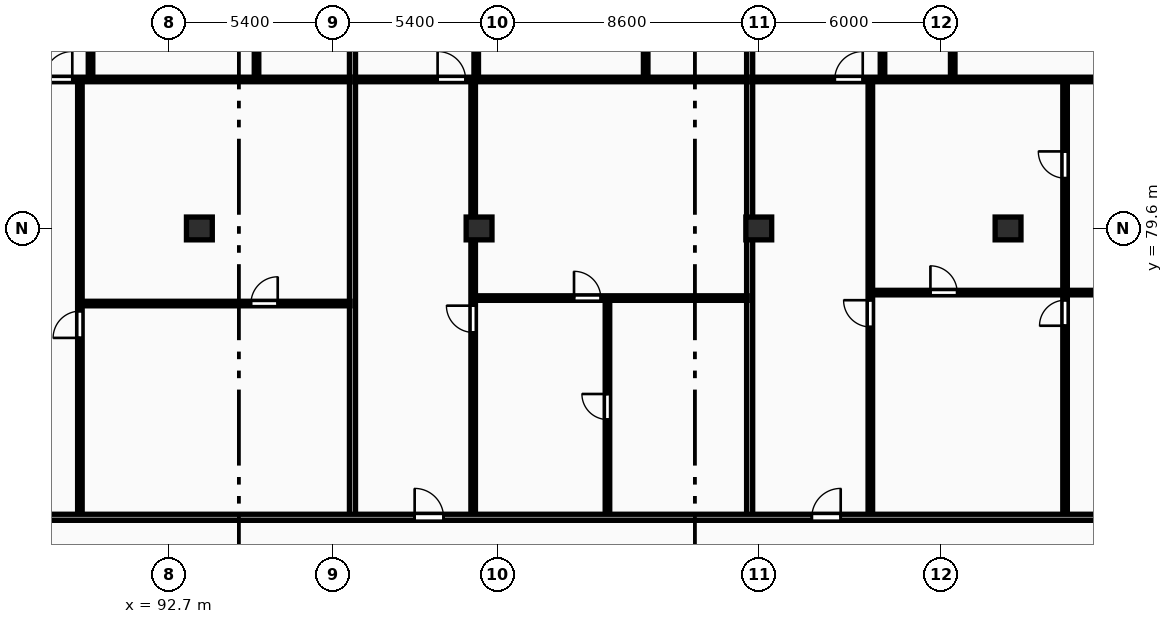
"""IFC4 building model, lengths in metres.
Left out: names, types, materials, properties, quantities, classifications, styles, units other than length and angle.
Written with IfcOpenShell. Run it as: python <this file> out.ifc"""

import sys

from ifc_helpers import new_model, si_unit, direction, frame, frame_2d, origin, origin_2d, place, context, subcontext, project, spatial, rectangle, extrude, element, fill, save


model = new_model("IFC4")
c1 = context("Model", 3, precision=1e-05, world=origin(), true_north=direction((0.0, 1.0)))
c2 = subcontext(c1, "Body", "Model", "MODEL_VIEW")
j1 = project(units=[si_unit("LENGTHUNIT", "METRE"), si_unit("PLANEANGLEUNIT", "RADIAN")], contexts=[c1])
p1 = place(None, origin())
s1 = spatial("IfcSite", under=j1, at=p1, CompositionType="ELEMENT")
p2 = place(p1, origin())
s2 = spatial("IfcBuilding", under=s1, at=p2, CompositionType="ELEMENT")
p3 = place(p2, frame((0.0, 0.0, 207.6)))
s3 = spatial("IfcBuildingStorey", under=s2, at=p3, CompositionType="ELEMENT", Elevation=207.6)
for number, where, z_axis, x_axis in (
    (1, (93.7, 79.6, 0.0), (0.0, 0.0, 1.0), (1.0, 0.0, 0.0)),
    (2, (102.9, 79.6, 0.0), (0.0, 0.0, 1.0), (1.0, 0.0, 0.0)),
    (3, (112.1, 79.6, 0.0), (0.0, 0.0, 1.0), (1.0, 0.0, 0.0)),
    (4, (120.3, 79.6, 0.0), (0.0, 0.0, 1.0), (1.0, 0.0, 0.0)),
):
    element("IfcColumn", number, at=place(p3, frame(where, z_axis=z_axis, x_axis=x_axis)), inside=s3, PredefinedType="COLUMN", context=c2, shape_type="SweptSolid", body=[
        extrude(rectangle(XDim=0.85, YDim=0.75, at=origin_2d()), origin(), (0.0, 0.0, 1.0), 3.25),
    ])
p4 = place(p3, frame((98.736, 70.18, 0.0), z_axis=(0.0, 0.0, 1.0), x_axis=(0.0, 1.0, 0.0)))
e5 = element("IfcWall", 5, at=p4, inside=s3, PredefinedType="PARTITIONING", context=c2, shape_type="SweptSolid", body=[
    extrude(rectangle(XDim=24.32, YDim=0.2, at=frame_2d((12.16, 0.0))), origin(), (0.0, 0.0, 1.0), 2.97),
])
p5 = place(p3, frame((89.83, 77.13, 0.0), z_axis=(0.0, 0.0, 1.0), x_axis=(1.0, 0.0, 0.0)))
e6 = element("IfcWall", 6, at=p5, inside=s3, PredefinedType="PARTITIONING", context=c2, shape_type="SweptSolid", body=[
    extrude(rectangle(XDim=8.826, YDim=0.15, at=frame_2d((4.413, 0.0))), origin(), (0.0, 0.0, 1.0), 2.97),
])
p6 = place(p5, frame((5.567, 0.0, 0.0)))
e7 = element("IfcOpeningElement", 7, at=p6, cuts=e6, PredefinedType="OPENING", context=c2, shape_type="SweptSolid", body=[
    extrude(rectangle(XDim=0.88, YDim=2.06, at=frame_2d((0.44, 1.03))), frame((0.0, 0.085, 0.0), z_axis=(0.0, -1.0, 0.0), x_axis=(1.0, 0.0, 0.0)), (0.0, 0.0, 1.0), 0.17),
])
p7 = place(p3, frame((89.77, 70.16, 0.0), z_axis=(0.0, 0.0, 1.0), x_axis=(0.0, 1.0, 0.0)))
e8 = element("IfcWall", 8, at=p7, inside=s3, PredefinedType="PARTITIONING", context=c2, shape_type="SweptSolid", body=[
    extrude(rectangle(XDim=14.3, YDim=0.15, at=frame_2d((7.15, 0.0))), origin(), (0.0, 0.0, 1.0), 2.97),
])
p8 = place(p7, frame((5.84, 0.0, 0.0)))
e9 = element("IfcOpeningElement", 9, at=p8, cuts=e8, PredefinedType="OPENING", context=c2, shape_type="SweptSolid", body=[
    extrude(rectangle(XDim=0.88, YDim=2.06, at=frame_2d((0.44, 1.03))), frame((0.0, 0.085, 0.0), z_axis=(0.0, -1.0, 0.0), x_axis=(1.0, 0.0, 0.0)), (0.0, 0.0, 1.0), 0.17),
])
p9 = place(p3, frame((90.12, 84.54, 0.0), z_axis=(0.0, 0.0, 1.0), x_axis=(0.0, 1.0, 0.0)))
e10 = element("IfcWall", 10, at=p9, inside=s3, PredefinedType="PARTITIONING", context=c2, shape_type="SweptSolid", body=[
    extrude(rectangle(XDim=5.0, YDim=0.15, at=frame_2d((2.5, 0.0))), origin(), (0.0, 0.0, 1.0), 2.97),
])
p10 = place(p9, frame((2.06, 0.0, 0.0)))
e11 = element("IfcOpeningElement", 11, at=p10, cuts=e10, PredefinedType="OPENING", context=c2, shape_type="SweptSolid", body=[
    extrude(rectangle(XDim=0.88, YDim=2.06, at=frame_2d((0.44, 1.03))), frame((0.0, 0.085, 0.0), z_axis=(0.0, -1.0, 0.0), x_axis=(1.0, 0.0, 0.0)), (0.0, 0.0, 1.0), 0.17),
])
p11 = place(p3, frame((95.58, 84.54, 0.0), z_axis=(0.0, 0.0, 1.0), x_axis=(0.0, 1.0, 0.0)))
e12 = element("IfcWall", 12, at=p11, inside=s3, PredefinedType="PARTITIONING", context=c2, shape_type="SweptSolid", body=[
    extrude(rectangle(XDim=9.96, YDim=0.15, at=frame_2d((4.98, 0.0))), origin(), (0.0, 0.0, 1.0), 2.97),
])
p12 = place(p11, frame((1.43, 0.0, 0.0)))
e13 = element("IfcOpeningElement", 13, at=p12, cuts=e12, PredefinedType="OPENING", context=c2, shape_type="SweptSolid", body=[
    extrude(rectangle(XDim=0.84, YDim=2.04, at=frame_2d((0.42, 1.02))), frame((0.0, 0.085, 0.0), z_axis=(0.0, -1.0, 0.0), x_axis=(1.0, 0.0, 0.0)), (0.0, 0.0, 1.0), 0.17),
])
p13 = place(p11, frame((3.92, 0.0, 0.0)))
e14 = element("IfcOpeningElement", 14, at=p13, cuts=e12, PredefinedType="OPENING", context=c2, shape_type="SweptSolid", body=[
    extrude(rectangle(XDim=0.84, YDim=2.04, at=frame_2d((0.42, 1.02))), frame((0.0, 0.085, 0.0), z_axis=(0.0, -1.0, 0.0), x_axis=(1.0, 0.0, 0.0)), (0.0, 0.0, 1.0), 0.17),
])
p14 = place(p11, frame((8.297, 0.0, 0.0)))
e15 = element("IfcOpeningElement", 15, at=p14, cuts=e12, PredefinedType="OPENING", context=c2, shape_type="SweptSolid", body=[
    extrude(rectangle(XDim=0.88, YDim=2.06, at=frame_2d((0.44, 1.03))), frame((0.0, 0.085, 0.0), z_axis=(0.0, -1.0, 0.0), x_axis=(1.0, 0.0, 0.0)), (0.0, 0.0, 1.0), 0.17),
])
p15 = place(p3, frame((85.88, 84.5, 0.0), z_axis=(0.0, 0.0, 1.0), x_axis=(1.0, 0.0, 0.0)))
e16 = element("IfcWall", 16, at=p15, inside=s3, PredefinedType="PARTITIONING", context=c2, shape_type="SweptSolid", body=[
    extrude(rectangle(XDim=12.776, YDim=0.15, at=frame_2d((6.388, 0.0))), origin(), (0.0, 0.0, 1.0), 2.97),
])
p16 = place(p15, frame((2.72, 0.0, 0.0)))
e17 = element("IfcOpeningElement", 17, at=p16, cuts=e16, PredefinedType="OPENING", context=c2, shape_type="SweptSolid", body=[
    extrude(rectangle(XDim=0.92, YDim=2.08, at=frame_2d((0.46, 1.04))), frame((0.0, 0.085, 0.0), z_axis=(0.0, -1.0, 0.0), x_axis=(1.0, 0.0, 0.0)), (0.0, 0.0, 1.0), 0.17),
])
p17 = place(p3, frame((111.8, 70.18, 0.0), z_axis=(0.0, 0.0, 1.0), x_axis=(0.0, 1.0, 0.0)))
e18 = element("IfcWall", 18, at=p17, inside=s3, PredefinedType="PARTITIONING", context=c2, shape_type="SweptSolid", body=[
    extrude(rectangle(XDim=24.32, YDim=0.2, at=frame_2d((12.16, 0.0))), origin(), (0.0, 0.0, 1.0), 2.97),
])
p18 = place(p3, frame((107.123, 70.16, 0.0), z_axis=(0.0, 0.0, 1.0), x_axis=(0.0, 1.0, 0.0)))
e19 = element("IfcWall", 19, at=p18, inside=s3, PredefinedType="PARTITIONING", context=c2, shape_type="SweptSolid", body=[
    extrude(rectangle(XDim=7.15, YDim=0.15, at=frame_2d((3.575, 0.0))), origin(), (0.0, 0.0, 1.0), 2.97),
])
p19 = place(p18, frame((3.155, 0.0, 0.0)))
e20 = element("IfcOpeningElement", 20, at=p19, cuts=e19, PredefinedType="OPENING", context=c2, shape_type="SweptSolid", body=[
    extrude(rectangle(XDim=0.84, YDim=2.04, at=frame_2d((0.42, 1.02))), frame((0.0, 0.085, 0.0), z_axis=(0.0, -1.0, 0.0), x_axis=(1.0, 0.0, 0.0)), (0.0, 0.0, 1.0), 0.17),
])
p20 = place(p3, frame((102.766, 77.31, 0.0), z_axis=(0.0, 0.0, 1.0), x_axis=(1.0, 0.0, 0.0)))
e21 = element("IfcWall", 21, at=p20, inside=s3, PredefinedType="PARTITIONING", context=c2, shape_type="SweptSolid", body=[
    extrude(rectangle(XDim=8.954, YDim=0.15, at=frame_2d((4.477, 0.0))), origin(), (0.0, 0.0, 1.0), 2.97),
])
p21 = place(p20, frame((3.257, 0.0, 0.0)))
e22 = element("IfcOpeningElement", 22, at=p21, cuts=e21, PredefinedType="OPENING", context=c2, shape_type="SweptSolid", body=[
    extrude(rectangle(XDim=0.88, YDim=2.06, at=frame_2d((0.44, 1.03))), frame((0.0, 0.085, 0.0), z_axis=(0.0, -1.0, 0.0), x_axis=(1.0, 0.0, 0.0)), (0.0, 0.0, 1.0), 0.17),
])
p22 = place(p3, frame((102.706, 70.16, 0.0), z_axis=(0.0, 0.0, 1.0), x_axis=(0.0, 1.0, 0.0)))
e23 = element("IfcWall", 23, at=p22, inside=s3, PredefinedType="PARTITIONING", context=c2, shape_type="SweptSolid", body=[
    extrude(rectangle(XDim=14.3, YDim=0.15, at=frame_2d((7.15, 0.0))), origin(), (0.0, 0.0, 1.0), 2.277),
])
p23 = place(p22, frame((6.02, 0.0, 0.0)))
e24 = element("IfcOpeningElement", 24, at=p23, cuts=e23, PredefinedType="OPENING", context=c2, shape_type="SweptSolid", body=[
    extrude(rectangle(XDim=0.88, YDim=2.06, at=frame_2d((0.44, 1.03))), frame((0.0, 0.085, 0.0), z_axis=(0.0, -1.0, 0.0), x_axis=(1.0, 0.0, 0.0)), (0.0, 0.0, 1.0), 0.17),
])
p24 = place(p3, frame((102.806, 84.54, 0.0), z_axis=(0.0, 0.0, 1.0), x_axis=(0.0, 1.0, 0.0)))
e25 = element("IfcWall", 25, at=p24, inside=s3, PredefinedType="PARTITIONING", context=c2, shape_type="SweptSolid", body=[
    extrude(rectangle(XDim=5.0, YDim=0.15, at=frame_2d((2.5, 0.0))), origin(), (0.0, 0.0, 1.0), 2.277),
])
p25 = place(p24, frame((2.06, 0.0, 0.0)))
e26 = element("IfcOpeningElement", 26, at=p25, cuts=e25, PredefinedType="OPENING", context=c2, shape_type="SweptSolid", body=[
    extrude(rectangle(XDim=0.88, YDim=2.06, at=frame_2d((0.44, 1.03))), frame((0.0, 0.085, 0.0), z_axis=(0.0, -1.0, 0.0), x_axis=(1.0, 0.0, 0.0)), (0.0, 0.0, 1.0), 0.17),
])
p26 = place(p3, frame((108.38, 84.54, 0.0), z_axis=(0.0, 0.0, 1.0), x_axis=(0.0, 1.0, 0.0)))
e27 = element("IfcWall", 27, at=p26, inside=s3, PredefinedType="PARTITIONING", context=c2, shape_type="SweptSolid", body=[
    extrude(rectangle(XDim=9.96, YDim=0.15, at=frame_2d((4.98, 0.0))), origin(), (0.0, 0.0, 1.0), 2.97),
])
p27 = place(p26, frame((1.43, 0.0, 0.0)))
e28 = element("IfcOpeningElement", 28, at=p27, cuts=e27, PredefinedType="OPENING", context=c2, shape_type="SweptSolid", body=[
    extrude(rectangle(XDim=0.84, YDim=2.04, at=frame_2d((0.42, 1.02))), frame((0.0, 0.085, 0.0), z_axis=(0.0, -1.0, 0.0), x_axis=(1.0, 0.0, 0.0)), (0.0, 0.0, 1.0), 0.17),
])
p28 = place(p26, frame((3.92, 0.0, 0.0)))
e29 = element("IfcOpeningElement", 29, at=p28, cuts=e27, PredefinedType="OPENING", context=c2, shape_type="SweptSolid", body=[
    extrude(rectangle(XDim=0.84, YDim=2.04, at=frame_2d((0.42, 1.02))), frame((0.0, 0.085, 0.0), z_axis=(0.0, -1.0, 0.0), x_axis=(1.0, 0.0, 0.0)), (0.0, 0.0, 1.0), 0.17),
])
p29 = place(p26, frame((5.48, 0.0, 0.0)))
e30 = element("IfcOpeningElement", 30, at=p29, cuts=e27, PredefinedType="OPENING", context=c2, shape_type="SweptSolid", body=[
    extrude(rectangle(XDim=0.88, YDim=2.06, at=frame_2d((0.44, 1.03))), frame((0.0, 0.085, 0.0), z_axis=(0.0, -1.0, 0.0), x_axis=(1.0, 0.0, 0.0)), (0.0, 0.0, 1.0), 0.17),
])
p30 = place(p3, frame((98.816, 84.5, 0.0), z_axis=(0.0, 0.0, 1.0), x_axis=(1.0, 0.0, 0.0)))
e31 = element("IfcWall", 31, at=p30, inside=s3, PredefinedType="PARTITIONING", context=c2, shape_type="SweptSolid", body=[
    extrude(rectangle(XDim=12.904, YDim=0.15, at=frame_2d((6.452, 0.0))), origin(), (0.0, 0.0, 1.0), 2.97),
])
p31 = place(p30, frame((2.72, 0.0, 0.0)))
e32 = element("IfcOpeningElement", 32, at=p31, cuts=e31, PredefinedType="OPENING", context=c2, shape_type="SweptSolid", body=[
    extrude(rectangle(XDim=0.92, YDim=2.08, at=frame_2d((0.46, 1.04))), frame((0.0, 0.085, 0.0), z_axis=(0.0, -1.0, 0.0), x_axis=(1.0, 0.0, 0.0)), (0.0, 0.0, 1.0), 0.17),
])
p32 = place(p3, frame((122.175, 70.16, 0.0), z_axis=(0.0, 0.0, 1.0), x_axis=(0.0, 1.0, 0.0)))
e33 = element("IfcWall", 33, at=p32, inside=s3, PredefinedType="PARTITIONING", context=c2, shape_type="SweptSolid", body=[
    extrude(rectangle(XDim=14.3, YDim=0.15, at=frame_2d((7.15, 0.0))), origin(), (0.0, 0.0, 1.0), 2.97),
])
p33 = place(p32, frame((6.24, 0.0, 0.0)))
e34 = element("IfcOpeningElement", 34, at=p33, cuts=e33, PredefinedType="OPENING", context=c2, shape_type="SweptSolid", body=[
    extrude(rectangle(XDim=0.84, YDim=2.04, at=frame_2d((0.42, 1.02))), frame((0.0, 0.085, 0.0), z_axis=(0.0, -1.0, 0.0), x_axis=(1.0, 0.0, 0.0)), (0.0, 0.0, 1.0), 0.17),
])
p34 = place(p32, frame((11.094, 0.0, 0.0)))
e35 = element("IfcOpeningElement", 35, at=p34, cuts=e33, PredefinedType="OPENING", context=c2, shape_type="SweptSolid", body=[
    extrude(rectangle(XDim=0.88, YDim=2.06, at=frame_2d((0.44, 1.03))), frame((0.0, 0.085, 0.0), z_axis=(0.0, -1.0, 0.0), x_axis=(1.0, 0.0, 0.0)), (0.0, 0.0, 1.0), 0.17),
])
p35 = place(p3, frame((115.83, 77.49, 0.0), z_axis=(0.0, 0.0, 1.0), x_axis=(1.0, 0.0, 0.0)))
e36 = element("IfcWall", 36, at=p35, inside=s3, PredefinedType="PARTITIONING", context=c2, shape_type="SweptSolid", body=[
    extrude(rectangle(XDim=12.49, YDim=0.15, at=frame_2d((6.245, 0.0))), origin(), (0.0, 0.0, 1.0), 2.97),
])
p36 = place(p35, frame((1.917, 0.0, 0.0)))
e37 = element("IfcOpeningElement", 37, at=p36, cuts=e36, PredefinedType="OPENING", context=c2, shape_type="SweptSolid", body=[
    extrude(rectangle(XDim=0.88, YDim=2.06, at=frame_2d((0.44, 1.03))), frame((0.0, 0.085, 0.0), z_axis=(0.0, -1.0, 0.0), x_axis=(1.0, 0.0, 0.0)), (0.0, 0.0, 1.0), 0.17),
])
p37 = place(p3, frame((115.77, 70.16, 0.0), z_axis=(0.0, 0.0, 1.0), x_axis=(0.0, 1.0, 0.0)))
e38 = element("IfcWall", 38, at=p37, inside=s3, PredefinedType="PARTITIONING", context=c2, shape_type="SweptSolid", body=[
    extrude(rectangle(XDim=14.3, YDim=0.15, at=frame_2d((7.15, 0.0))), origin(), (0.0, 0.0, 1.0), 2.97),
])
p38 = place(p37, frame((6.2, 0.0, 0.0)))
e39 = element("IfcOpeningElement", 39, at=p38, cuts=e38, PredefinedType="OPENING", context=c2, shape_type="SweptSolid", body=[
    extrude(rectangle(XDim=0.88, YDim=2.06, at=frame_2d((0.44, 1.03))), frame((0.0, 0.085, 0.0), z_axis=(0.0, -1.0, 0.0), x_axis=(1.0, 0.0, 0.0)), (0.0, 0.0, 1.0), 0.17),
])
p39 = place(p3, frame((118.48, 84.54, 0.0), z_axis=(0.0, 0.0, 1.0), x_axis=(0.0, 1.0, 0.0)))
e40 = element("IfcWall", 40, at=p39, inside=s3, PredefinedType="PARTITIONING", context=c2, shape_type="SweptSolid", body=[
    extrude(rectangle(XDim=2.47, YDim=0.15, at=frame_2d((1.235, 0.0))), origin(), (0.0, 0.0, 1.0), 2.97),
])
p40 = place(p3, frame((116.17, 84.54, 0.0), z_axis=(0.0, 0.0, 1.0), x_axis=(0.0, 1.0, 0.0)))
e41 = element("IfcWall", 41, at=p40, inside=s3, PredefinedType="PARTITIONING", context=c2, shape_type="SweptSolid", body=[
    extrude(rectangle(XDim=9.96, YDim=0.15, at=frame_2d((4.98, 0.0))), origin(), (0.0, 0.0, 1.0), 2.97),
])
p41 = place(p40, frame((3.82, 0.0, 0.0)))
e42 = element("IfcOpeningElement", 42, at=p41, cuts=e41, PredefinedType="OPENING", context=c2, shape_type="SweptSolid", body=[
    extrude(rectangle(XDim=0.92, YDim=2.08, at=frame_2d((0.46, 1.04))), frame((0.0, 0.085, 0.0), z_axis=(0.0, -1.0, 0.0), x_axis=(1.0, 0.0, 0.0)), (0.0, 0.0, 1.0), 0.17),
])
p42 = place(p3, frame((111.88, 84.5, 0.0), z_axis=(0.0, 0.0, 1.0), x_axis=(1.0, 0.0, 0.0)))
e43 = element("IfcWall", 43, at=p42, inside=s3, PredefinedType="PARTITIONING", context=c2, shape_type="SweptSolid", body=[
    extrude(rectangle(XDim=16.44, YDim=0.15, at=frame_2d((8.22, 0.0))), origin(), (0.0, 0.0, 1.0), 2.97),
])
p43 = place(p42, frame((2.72, 0.0, 0.0)))
e44 = element("IfcOpeningElement", 44, at=p43, cuts=e43, PredefinedType="OPENING", context=c2, shape_type="SweptSolid", body=[
    extrude(rectangle(XDim=0.92, YDim=2.08, at=frame_2d((0.46, 1.04))), frame((0.0, 0.085, 0.0), z_axis=(0.0, -1.0, 0.0), x_axis=(1.0, 0.0, 0.0)), (0.0, 0.0, 1.0), 0.17),
])
p44 = place(p3, frame((59.8, 70.1, 0.0), z_axis=(0.0, 0.0, 1.0), x_axis=(1.0, 0.0, 0.0)))
e45 = element("IfcWall", 45, at=p44, inside=s3, PredefinedType="PARTITIONING", context=c2, shape_type="SweptSolid", body=[
    extrude(rectangle(XDim=68.6, YDim=0.2, at=frame_2d((34.3, 0.0))), origin(), (0.0, 0.0, 1.0), 2.97),
])
p45 = place(p44, frame((2.045, 0.0, 0.0)))
e46 = element("IfcOpeningElement", 46, at=p45, cuts=e45, PredefinedType="OPENING", context=c2, shape_type="SweptSolid", body=[
    extrude(rectangle(XDim=0.95, YDim=2.15, at=frame_2d((0.475, 1.075))), frame((0.0, 0.11, 0.0), z_axis=(0.0, -1.0, 0.0), x_axis=(1.0, 0.0, 0.0)), (0.0, 0.0, 1.0), 0.22),
])
p46 = place(p44, frame((14.981, 0.0, 0.0)))
e47 = element("IfcOpeningElement", 47, at=p46, cuts=e45, PredefinedType="OPENING", context=c2, shape_type="SweptSolid", body=[
    extrude(rectangle(XDim=0.95, YDim=2.15, at=frame_2d((0.475, 1.075))), frame((0.0, 0.11, 0.0), z_axis=(0.0, -1.0, 0.0), x_axis=(1.0, 0.0, 0.0)), (0.0, 0.0, 1.0), 0.22),
])
p47 = place(p44, frame((28.045, 0.0, 0.0)))
e48 = element("IfcOpeningElement", 48, at=p47, cuts=e45, PredefinedType="OPENING", context=c2, shape_type="SweptSolid", body=[
    extrude(rectangle(XDim=0.95, YDim=2.15, at=frame_2d((0.475, 1.075))), frame((0.0, 0.11, 0.0), z_axis=(0.0, -1.0, 0.0), x_axis=(1.0, 0.0, 0.0)), (0.0, 0.0, 1.0), 0.22),
])
p48 = place(p44, frame((40.981, 0.0, 0.0)))
e49 = element("IfcOpeningElement", 49, at=p48, cuts=e45, PredefinedType="OPENING", context=c2, shape_type="SweptSolid", body=[
    extrude(rectangle(XDim=0.95, YDim=2.15, at=frame_2d((0.475, 1.075))), frame((0.0, 0.11, 0.0), z_axis=(0.0, -1.0, 0.0), x_axis=(1.0, 0.0, 0.0)), (0.0, 0.0, 1.0), 0.22),
])
p49 = place(p44, frame((54.045, 0.0, 0.0)))
e50 = element("IfcOpeningElement", 50, at=p49, cuts=e45, PredefinedType="OPENING", context=c2, shape_type="SweptSolid", body=[
    extrude(rectangle(XDim=0.95, YDim=2.15, at=frame_2d((0.475, 1.075))), frame((0.0, 0.11, 0.0), z_axis=(0.0, -1.0, 0.0), x_axis=(1.0, 0.0, 0.0)), (0.0, 0.0, 1.0), 0.22),
])
p50 = place(p6, origin())
e51 = element("IfcDoor", 51, at=p50, inside=s3, OperationType="SINGLE_SWING_RIGHT", PredefinedType="DOOR", context=c2, shape_type="SweptSolid", body=[
    extrude(rectangle(XDim=0.88, YDim=2.06, at=frame_2d((0.44, 1.03))), frame((0.0, 0.025, 0.0), z_axis=(0.0, -1.0, 0.0), x_axis=(1.0, 0.0, 0.0)), (0.0, 0.0, 1.0), 0.05),
])
fill(e7, e51)
p51 = place(p8, origin())
e52 = element("IfcDoor", 52, at=p51, inside=s3, OperationType="SINGLE_SWING_LEFT", PredefinedType="DOOR", context=c2, shape_type="SweptSolid", body=[
    extrude(rectangle(XDim=0.88, YDim=2.06, at=frame_2d((0.44, 1.03))), frame((0.0, 0.025, 0.0), z_axis=(0.0, -1.0, 0.0), x_axis=(1.0, 0.0, 0.0)), (0.0, 0.0, 1.0), 0.05),
])
fill(e9, e52)
p52 = place(p16, origin())
e53 = element("IfcDoor", 53, at=p52, inside=s3, OperationType="SINGLE_SWING_RIGHT", PredefinedType="DOOR", context=c2, shape_type="SweptSolid", body=[
    extrude(rectangle(XDim=0.92, YDim=2.08, at=frame_2d((0.46, 1.04))), frame((0.0, 0.025, 0.0), z_axis=(0.0, -1.0, 0.0), x_axis=(1.0, 0.0, 0.0)), (0.0, 0.0, 1.0), 0.05),
])
fill(e17, e53)
p53 = place(p19, origin())
e54 = element("IfcDoor", 54, at=p53, inside=s3, OperationType="SINGLE_SWING_RIGHT", PredefinedType="DOOR", context=c2, shape_type="SweptSolid", body=[
    extrude(rectangle(XDim=0.84, YDim=2.04, at=frame_2d((0.42, 1.02))), frame((0.0, 0.025, 0.0), z_axis=(0.0, -1.0, 0.0), x_axis=(1.0, 0.0, 0.0)), (0.0, 0.0, 1.0), 0.05),
])
fill(e20, e54)
p54 = place(p21, origin())
e55 = element("IfcDoor", 55, at=p54, inside=s3, OperationType="SINGLE_SWING_LEFT", PredefinedType="DOOR", context=c2, shape_type="SweptSolid", body=[
    extrude(rectangle(XDim=0.88, YDim=2.06, at=frame_2d((0.44, 1.03))), frame((0.0, 0.025, 0.0), z_axis=(0.0, -1.0, 0.0), x_axis=(1.0, 0.0, 0.0)), (0.0, 0.0, 1.0), 0.05),
])
fill(e22, e55)
p55 = place(p23, origin())
e56 = element("IfcDoor", 56, at=p55, inside=s3, OperationType="SINGLE_SWING_RIGHT", PredefinedType="DOOR", context=c2, shape_type="SweptSolid", body=[
    extrude(rectangle(XDim=0.88, YDim=2.06, at=frame_2d((0.44, 1.03))), frame((0.0, 0.025, 0.0), z_axis=(0.0, -1.0, 0.0), x_axis=(1.0, 0.0, 0.0)), (0.0, 0.0, 1.0), 0.05),
])
fill(e24, e56)
p56 = place(p31, origin())
e57 = element("IfcDoor", 57, at=p56, inside=s3, OperationType="SINGLE_SWING_LEFT", PredefinedType="DOOR", context=c2, shape_type="SweptSolid", body=[
    extrude(rectangle(XDim=0.92, YDim=2.08, at=frame_2d((0.46, 1.04))), frame((0.0, 0.025, 0.0), z_axis=(0.0, -1.0, 0.0), x_axis=(1.0, 0.0, 0.0)), (0.0, 0.0, 1.0), 0.05),
])
fill(e32, e57)
p57 = place(p33, origin())
e58 = element("IfcDoor", 58, at=p57, inside=s3, OperationType="SINGLE_SWING_LEFT", PredefinedType="DOOR", context=c2, shape_type="SweptSolid", body=[
    extrude(rectangle(XDim=0.84, YDim=2.04, at=frame_2d((0.42, 1.02))), frame((0.0, 0.025, 0.0), z_axis=(0.0, -1.0, 0.0), x_axis=(1.0, 0.0, 0.0)), (0.0, 0.0, 1.0), 0.05),
])
fill(e34, e58)
p58 = place(p34, origin())
e59 = element("IfcDoor", 59, at=p58, inside=s3, OperationType="SINGLE_SWING_RIGHT", PredefinedType="DOOR", context=c2, shape_type="SweptSolid", body=[
    extrude(rectangle(XDim=0.88, YDim=2.06, at=frame_2d((0.44, 1.03))), frame((0.0, 0.025, 0.0), z_axis=(0.0, -1.0, 0.0), x_axis=(1.0, 0.0, 0.0)), (0.0, 0.0, 1.0), 0.05),
])
fill(e35, e59)
p59 = place(p36, origin())
e60 = element("IfcDoor", 60, at=p59, inside=s3, OperationType="SINGLE_SWING_LEFT", PredefinedType="DOOR", context=c2, shape_type="SweptSolid", body=[
    extrude(rectangle(XDim=0.88, YDim=2.06, at=frame_2d((0.44, 1.03))), frame((0.0, 0.025, 0.0), z_axis=(0.0, -1.0, 0.0), x_axis=(1.0, 0.0, 0.0)), (0.0, 0.0, 1.0), 0.05),
])
fill(e37, e60)
p60 = place(p38, origin())
e61 = element("IfcDoor", 61, at=p60, inside=s3, OperationType="SINGLE_SWING_RIGHT", PredefinedType="DOOR", context=c2, shape_type="SweptSolid", body=[
    extrude(rectangle(XDim=0.88, YDim=2.06, at=frame_2d((0.44, 1.03))), frame((0.0, 0.025, 0.0), z_axis=(0.0, -1.0, 0.0), x_axis=(1.0, 0.0, 0.0)), (0.0, 0.0, 1.0), 0.05),
])
fill(e39, e61)
p61 = place(p43, origin())
e62 = element("IfcDoor", 62, at=p61, inside=s3, OperationType="SINGLE_SWING_RIGHT", PredefinedType="DOOR", context=c2, shape_type="SweptSolid", body=[
    extrude(rectangle(XDim=0.92, YDim=2.08, at=frame_2d((0.46, 1.04))), frame((0.0, 0.025, 0.0), z_axis=(0.0, -1.0, 0.0), x_axis=(1.0, 0.0, 0.0)), (0.0, 0.0, 1.0), 0.05),
])
fill(e44, e62)
p62 = place(p48, origin())
e63 = element("IfcDoor", 63, at=p62, inside=s3, OperationType="SINGLE_SWING_LEFT", PredefinedType="DOOR", context=c2, shape_type="SweptSolid", body=[
    extrude(rectangle(XDim=0.95, YDim=2.15, at=frame_2d((0.475, 1.075))), frame((0.0, 0.025, 0.0), z_axis=(0.0, -1.0, 0.0), x_axis=(1.0, 0.0, 0.0)), (0.0, 0.0, 1.0), 0.05),
])
fill(e49, e63)
p63 = place(p49, origin())
e64 = element("IfcDoor", 64, at=p63, inside=s3, OperationType="SINGLE_SWING_RIGHT", PredefinedType="DOOR", context=c2, shape_type="SweptSolid", body=[
    extrude(rectangle(XDim=0.95, YDim=2.15, at=frame_2d((0.475, 1.075))), frame((0.0, 0.025, 0.0), z_axis=(0.0, -1.0, 0.0), x_axis=(1.0, 0.0, 0.0)), (0.0, 0.0, 1.0), 0.05),
])
fill(e50, e64)
save(model, sys.argv[1])
